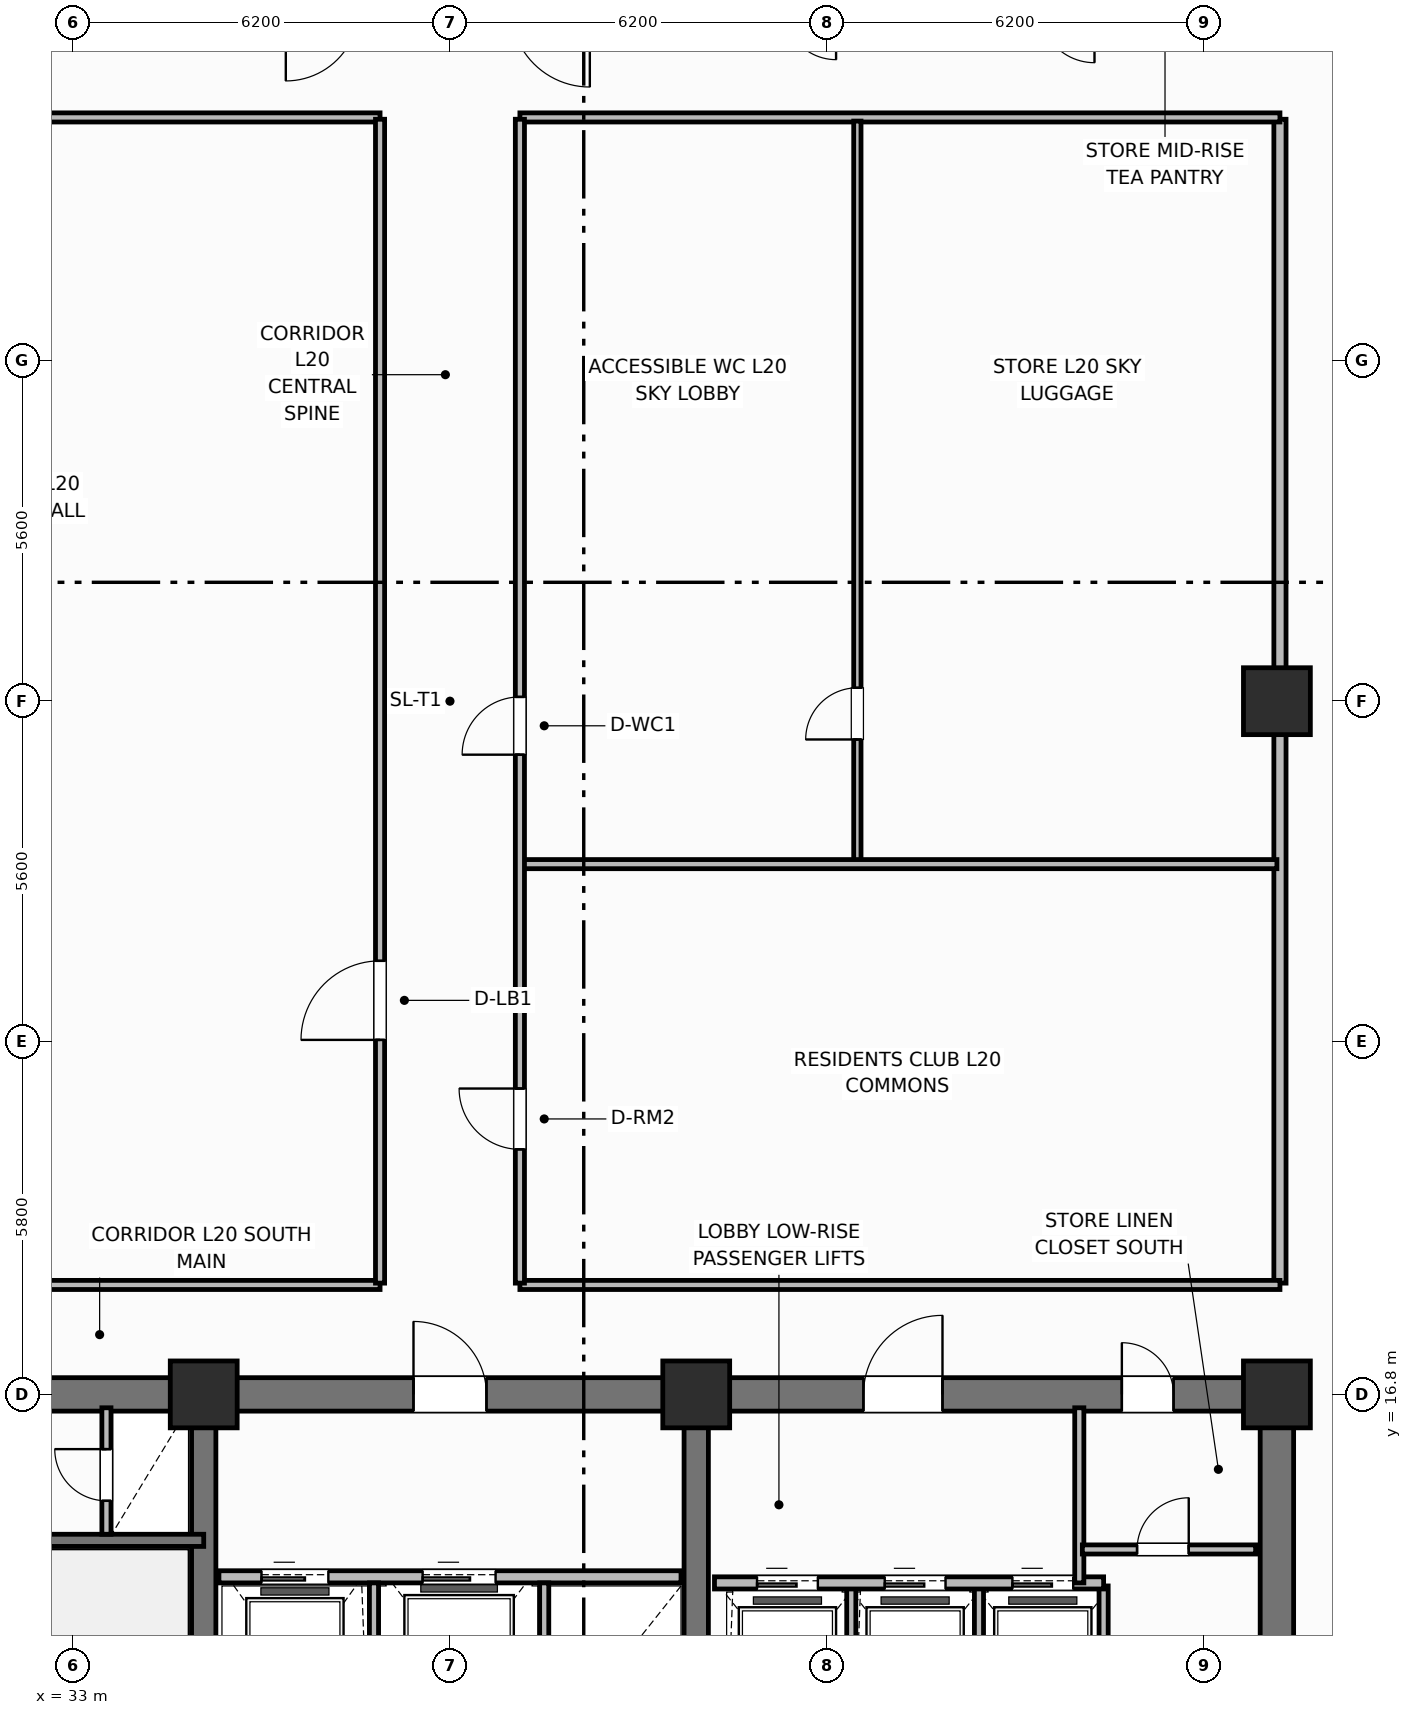
"""IFC4 building model, lengths in metres.
Left out: names, types, materials, properties, quantities, classifications, styles, units other than length and angle.
Written with IfcOpenShell. Run it as: python <this file> out.ifc"""

import sys

from ifc_helpers import new_model, si_unit, direction, frame, frame_2d, origin, origin_2d, place, context, subcontext, project, spatial, rectangle, extrude, element, fill, save


model = new_model("IFC4")
c1 = context("Model", 3, precision=1e-05, world=origin(), true_north=direction((0.0, 1.0)))
c2 = subcontext(c1, "Body", "Model", "MODEL_VIEW")
j1 = project(units=[si_unit("LENGTHUNIT", "METRE"), si_unit("PLANEANGLEUNIT", "RADIAN")], contexts=[c1])
p1 = place(None, origin())
s1 = spatial("IfcSite", under=j1, at=p1, CompositionType="ELEMENT")
p2 = place(p1, origin())
s2 = spatial("IfcBuilding", under=s1, at=p2, CompositionType="ELEMENT")
p3 = place(p2, frame((0.0, 0.0, 84.1)))
s3 = spatial("IfcBuildingStorey", under=s2, at=p3, CompositionType="ELEMENT", Elevation=84.1)
p4 = place(p3, frame((52.8, 10.875, 0.0), z_axis=(0.0, 0.0, 1.0), x_axis=(0.0, 1.0, 0.0)))
e1 = element("IfcWall", 1, at=p4, inside=s3, PredefinedType="SHEAR", context=c2, shape_type="SweptSolid", body=[
    extrude(rectangle(XDim=5.65, YDim=0.55, at=frame_2d((2.825, 0.0))), origin(), (0.0, 0.0, 1.0), 4.2),
])
p5 = place(p3, frame((25.6, 16.8, 0.0), z_axis=(0.0, 0.0, 1.0), x_axis=(1.0, 0.0, 0.0)))
e2 = element("IfcWall", 2, at=p5, inside=s3, PredefinedType="SHEAR", context=c2, shape_type="SweptSolid", body=[
    extrude(rectangle(XDim=27.2, YDim=0.55, at=frame_2d((13.6, 0.0))), origin(), (0.0, 0.0, 1.0), 4.2),
])
p6 = place(p5, frame((1.8, 0.0, 0.0)))
e3 = element("IfcOpeningElement", 3, at=p6, cuts=e2, PredefinedType="OPENING", context=c2, shape_type="SweptSolid", body=[
    extrude(rectangle(XDim=1.1, YDim=2.15, at=frame_2d((0.55, 1.075))), frame((0.0, 0.285, 0.0), z_axis=(0.0, -1.0, 0.0), x_axis=(1.0, 0.0, 0.0)), (0.0, 0.0, 1.0), 0.57),
])
p7 = place(p5, frame((5.6, 0.0, 0.0)))
e4 = element("IfcOpeningElement", 4, at=p7, cuts=e2, PredefinedType="OPENING", context=c2, shape_type="SweptSolid", body=[
    extrude(rectangle(XDim=0.85, YDim=2.1, at=frame_2d((0.425, 1.05))), frame((0.0, 0.285, 0.0), z_axis=(0.0, -1.0, 0.0), x_axis=(1.0, 0.0, 0.0)), (0.0, 0.0, 1.0), 0.57),
])
p8 = place(p5, frame((13.0, 0.0, 0.0)))
e5 = element("IfcOpeningElement", 5, at=p8, cuts=e2, PredefinedType="OPENING", context=c2, shape_type="SweptSolid", body=[
    extrude(rectangle(XDim=1.2, YDim=2.15, at=frame_2d((0.6, 1.075))), frame((0.0, 0.285, 0.0), z_axis=(0.0, -1.0, 0.0), x_axis=(1.0, 0.0, 0.0)), (0.0, 0.0, 1.0), 0.57),
])
p9 = place(p5, frame((20.4, 0.0, 0.0)))
e6 = element("IfcOpeningElement", 6, at=p9, cuts=e2, PredefinedType="OPENING", context=c2, shape_type="SweptSolid", body=[
    extrude(rectangle(XDim=1.3, YDim=2.2, at=frame_2d((0.65, 1.1))), frame((0.0, 0.285, 0.0), z_axis=(0.0, -1.0, 0.0), x_axis=(1.0, 0.0, 0.0)), (0.0, 0.0, 1.0), 0.57),
])
p10 = place(p5, frame((24.65, 0.0, 0.0)))
e7 = element("IfcOpeningElement", 7, at=p10, cuts=e2, PredefinedType="OPENING", context=c2, shape_type="SweptSolid", body=[
    extrude(rectangle(XDim=0.85, YDim=2.1, at=frame_2d((0.425, 1.05))), frame((0.0, 0.285, 0.0), z_axis=(0.0, -1.0, 0.0), x_axis=(1.0, 0.0, 0.0)), (0.0, 0.0, 1.0), 0.57),
])
for number, where, z_axis, x_axis in (
    (8, (35.15, 10.875, 0.0), (0.0, 0.0, 1.0), (0.0, 1.0, 0.0)),
    (9, (43.25, 10.875, 0.0), (0.0, 0.0, 1.0), (0.0, 1.0, 0.0)),
):
    element("IfcWall", number, at=place(p3, frame(where, z_axis=z_axis, x_axis=x_axis)), inside=s3, PredefinedType="SHEAR", context=c2, shape_type="SweptSolid", body=[
        extrude(rectangle(XDim=5.65, YDim=0.4, at=frame_2d((2.825, 0.0))), origin(), (0.0, 0.0, 1.0), 4.2),
    ])
for number, where, z_axis, x_axis in (
    (10, (35.15, 16.8, 0.0), (0.0, 0.0, 1.0), (1.0, 0.0, 0.0)),
    (11, (43.25, 16.8, 0.0), (0.0, 0.0, 1.0), (1.0, 0.0, 0.0)),
    (12, (52.8, 16.8, 0.0), (0.0, 0.0, 1.0), (1.0, 0.0, 0.0)),
    (13, (52.8, 28.2, 0.0), (0.0, 0.0, 1.0), (1.0, 0.0, 0.0)),
):
    element("IfcColumn", number, at=place(p3, frame(where, z_axis=z_axis, x_axis=x_axis)), inside=s3, PredefinedType="COLUMN", context=c2, shape_type="SweptSolid", body=[
        extrude(rectangle(XDim=1.1, YDim=1.1, at=origin_2d()), origin(), (0.0, 0.0, 1.0), 4.2),
    ])
p11 = place(p3, frame((25.6, 14.4, 0.0), z_axis=(0.0, 0.0, 1.0), x_axis=(1.0, 0.0, 0.0)))
e14 = element("IfcWall", 14, at=p11, inside=s3, PredefinedType="SHEAR", context=c2, shape_type="SweptSolid", body=[
    extrude(rectangle(XDim=9.55, YDim=0.2, at=frame_2d((4.775, 0.0))), origin(), (0.0, 0.0, 1.0), 4.2),
])
p12 = place(p11, frame((1.05, 0.0, 0.0)))
e15 = element("IfcOpeningElement", 15, at=p12, cuts=e14, PredefinedType="OPENING", context=c2, shape_type="SweptSolid", body=[
    extrude(rectangle(XDim=1.1, YDim=2.15, at=frame_2d((0.55, 1.075))), frame((0.0, 0.11, 0.0), z_axis=(0.0, -1.0, 0.0), x_axis=(1.0, 0.0, 0.0)), (0.0, 0.0, 1.0), 0.22),
])
p13 = place(p3, frame((33.55, 14.5, 0.0), z_axis=(0.0, 0.0, 1.0), x_axis=(0.0, 1.0, 0.0)))
e16 = element("IfcWall", 16, at=p13, inside=s3, PredefinedType="PARTITIONING", context=c2, shape_type="SweptSolid", body=[
    extrude(rectangle(XDim=2.08, YDim=0.15, at=frame_2d((1.04, 0.0))), origin(), (0.0, 0.0, 1.0), 3.03),
])
p14 = place(p13, frame((0.55, 0.0, 0.0)))
e17 = element("IfcOpeningElement", 17, at=p14, cuts=e16, PredefinedType="OPENING", context=c2, shape_type="SweptSolid", body=[
    extrude(rectangle(XDim=0.85, YDim=2.05, at=frame_2d((0.425, 1.025))), frame((0.0, 0.085, 0.0), z_axis=(0.0, -1.0, 0.0), x_axis=(1.0, 0.0, 0.0)), (0.0, 0.0, 1.0), 0.17),
])
p15 = place(p3, frame((35.4, 13.8, 0.0), z_axis=(0.0, 0.0, 1.0), x_axis=(1.0, 0.0, 0.0)))
e18 = element("IfcWall", 18, at=p15, inside=s3, PredefinedType="PARTITIONING", context=c2, shape_type="SweptSolid", body=[
    extrude(rectangle(XDim=7.6, YDim=0.2, at=frame_2d((3.8, 0.0))), origin(), (0.0, 0.0, 1.0), 2.8),
])
p16 = place(p15, frame((0.7, 0.0, 0.0)))
e19 = element("IfcOpeningElement", 19, at=p16, cuts=e18, PredefinedType="OPENING", context=c2, shape_type="SweptSolid", body=[
    extrude(rectangle(XDim=1.1, YDim=2.15, at=frame_2d((0.55, 1.075))), frame((0.0, 0.11, 0.0), z_axis=(0.0, -1.0, 0.0), x_axis=(1.0, 0.0, 0.0)), (0.0, 0.0, 1.0), 0.22),
])
p17 = place(p15, frame((3.35, 0.0, 0.0)))
e20 = element("IfcOpeningElement", 20, at=p17, cuts=e18, PredefinedType="OPENING", context=c2, shape_type="SweptSolid", body=[
    extrude(rectangle(XDim=1.2, YDim=2.15, at=frame_2d((0.6, 1.075))), frame((0.0, 0.11, 0.0), z_axis=(0.0, -1.0, 0.0), x_axis=(1.0, 0.0, 0.0)), (0.0, 0.0, 1.0), 0.22),
])
for number, where, z_axis, x_axis in (
    (21, (37.95, 10.95, 0.0), (0.0, 0.0, 1.0), (0.0, 1.0, 0.0)),
    (22, (40.75, 10.95, 0.0), (0.0, 0.0, 1.0), (0.0, 1.0, 0.0)),
):
    element("IfcWall", number, at=place(p3, frame(where, z_axis=z_axis, x_axis=x_axis)), inside=s3, PredefinedType="PARTITIONING", context=c2, shape_type="SweptSolid", body=[
        extrude(rectangle(XDim=2.75, YDim=0.15, at=frame_2d((1.375, 0.0))), origin(), (0.0, 0.0, 1.0), 3.03),
    ])
for number, where, z_axis, x_axis in (
    (23, (45.8, 10.95, 0.0), (0.0, 0.0, 1.0), (0.0, 1.0, 0.0)),
    (24, (47.9, 10.95, 0.0), (0.0, 0.0, 1.0), (0.0, 1.0, 0.0)),
    (25, (49.95, 10.95, 0.0), (0.0, 0.0, 1.0), (0.0, 1.0, 0.0)),
):
    element("IfcWall", number, at=place(p3, frame(where, z_axis=z_axis, x_axis=x_axis)), inside=s3, PredefinedType="PARTITIONING", context=c2, shape_type="SweptSolid", body=[
        extrude(rectangle(XDim=2.7, YDim=0.15, at=frame_2d((1.35, 0.0))), origin(), (0.0, 0.0, 1.0), 3.03),
    ])
p18 = place(p3, frame((43.55, 13.7, 0.0), z_axis=(0.0, 0.0, 1.0), x_axis=(1.0, 0.0, 0.0)))
e26 = element("IfcWall", 26, at=p18, inside=s3, PredefinedType="PARTITIONING", context=c2, shape_type="SweptSolid", body=[
    extrude(rectangle(XDim=6.4, YDim=0.2, at=frame_2d((3.2, 0.0))), origin(), (0.0, 0.0, 1.0), 3.03),
])
p19 = place(p18, frame((0.7, 0.0, 0.0)))
e27 = element("IfcOpeningElement", 27, at=p19, cuts=e26, PredefinedType="OPENING", context=c2, shape_type="SweptSolid", body=[
    extrude(rectangle(XDim=1.0, YDim=2.15, at=frame_2d((0.5, 1.075))), frame((0.0, 0.11, 0.0), z_axis=(0.0, -1.0, 0.0), x_axis=(1.0, 0.0, 0.0)), (0.0, 0.0, 1.0), 0.22),
])
p20 = place(p18, frame((2.8, 0.0, 0.0)))
e28 = element("IfcOpeningElement", 28, at=p20, cuts=e26, PredefinedType="OPENING", context=c2, shape_type="SweptSolid", body=[
    extrude(rectangle(XDim=1.0, YDim=2.15, at=frame_2d((0.5, 1.075))), frame((0.0, 0.11, 0.0), z_axis=(0.0, -1.0, 0.0), x_axis=(1.0, 0.0, 0.0)), (0.0, 0.0, 1.0), 0.22),
])
p21 = place(p18, frame((4.9, 0.0, 0.0)))
e29 = element("IfcOpeningElement", 29, at=p21, cuts=e26, PredefinedType="OPENING", context=c2, shape_type="SweptSolid", body=[
    extrude(rectangle(XDim=1.0, YDim=2.15, at=frame_2d((0.5, 1.075))), frame((0.0, 0.11, 0.0), z_axis=(0.0, -1.0, 0.0), x_axis=(1.0, 0.0, 0.0)), (0.0, 0.0, 1.0), 0.22),
])
p22 = place(p3, frame((49.55, 13.7, 0.0), z_axis=(0.0, 0.0, 1.0), x_axis=(0.0, 1.0, 0.0)))
e30 = element("IfcWall", 30, at=p22, inside=s3, PredefinedType="PARTITIONING", context=c2, shape_type="SweptSolid", body=[
    extrude(rectangle(XDim=2.88, YDim=0.15, at=frame_2d((1.44, 0.0))), origin(), (0.0, 0.0, 1.0), 3.03),
])
p23 = place(p3, frame((49.6, 14.25, 0.0), z_axis=(0.0, 0.0, 1.0), x_axis=(1.0, 0.0, 0.0)))
e31 = element("IfcWall", 31, at=p23, inside=s3, PredefinedType="PARTITIONING", context=c2, shape_type="SweptSolid", body=[
    extrude(rectangle(XDim=2.85, YDim=0.15, at=frame_2d((1.425, 0.0))), origin(), (0.0, 0.0, 1.0), 3.03),
])
p24 = place(p23, frame((0.9, 0.0, 0.0)))
e32 = element("IfcOpeningElement", 32, at=p24, cuts=e31, PredefinedType="OPENING", context=c2, shape_type="SweptSolid", body=[
    extrude(rectangle(XDim=0.85, YDim=2.1, at=frame_2d((0.425, 1.05))), frame((0.0, 0.085, 0.0), z_axis=(0.0, -1.0, 0.0), x_axis=(1.0, 0.0, 0.0)), (0.0, 0.0, 1.0), 0.17),
])
p25 = place(p3, frame((52.85, 18.63, 0.0), z_axis=(0.0, 0.0, 1.0), x_axis=(0.0, 1.0, 0.0)))
e33 = element("IfcWall", 33, at=p25, inside=s3, PredefinedType="PARTITIONING", context=c2, shape_type="SweptSolid", body=[
    extrude(rectangle(XDim=19.14, YDim=0.2, at=frame_2d((9.57, 0.0))), origin(), (0.0, 0.0, 1.0), 3.03),
])
for number, where, z_axis, x_axis in (
    (34, (25.55, 18.6, 0.0), (0.0, 0.0, 1.0), (1.0, 0.0, 0.0)),
    (35, (40.35, 18.6, 0.0), (0.0, 0.0, 1.0), (1.0, 0.0, 0.0)),
    (36, (25.55, 37.8, 0.0), (0.0, 0.0, 1.0), (1.0, 0.0, 0.0)),
    (37, (40.35, 37.8, 0.0), (0.0, 0.0, 1.0), (1.0, 0.0, 0.0)),
):
    element("IfcWall", number, at=place(p3, frame(where, z_axis=z_axis, x_axis=x_axis)), inside=s3, PredefinedType="PARTITIONING", context=c2, shape_type="SweptSolid", body=[
        extrude(rectangle(XDim=12.5, YDim=0.15, at=frame_2d((6.25, 0.0))), origin(), (0.0, 0.0, 1.0), 3.03),
    ])
p26 = place(p3, frame((45.9, 25.57, 0.0), z_axis=(0.0, 0.0, 1.0), x_axis=(0.0, 1.0, 0.0)))
e38 = element("IfcWall", 38, at=p26, inside=s3, PredefinedType="PARTITIONING", context=c2, shape_type="SweptSolid", body=[
    extrude(rectangle(XDim=12.17, YDim=0.12, at=frame_2d((6.085, 0.0))), origin(), (0.0, 0.0, 1.0), 3.03),
])
p27 = place(p26, frame((2.0, 0.0, 0.0)))
e39 = element("IfcOpeningElement", 39, at=p27, cuts=e38, PredefinedType="OPENING", context=c2, shape_type="SweptSolid", body=[
    extrude(rectangle(XDim=0.85, YDim=2.1, at=frame_2d((0.425, 1.05))), frame((0.0, 0.07, 0.0), z_axis=(0.0, -1.0, 0.0), x_axis=(1.0, 0.0, 0.0)), (0.0, 0.0, 1.0), 0.14),
])
p28 = place(p3, frame((40.38, 25.521, 0.0), z_axis=(0.0, 0.0, 1.0), x_axis=(1.0, 0.0, 0.0)))
e40 = element("IfcWall", 40, at=p28, inside=s3, PredefinedType="PARTITIONING", context=c2, shape_type="SweptSolid", body=[
    extrude(rectangle(XDim=12.42, YDim=0.15, at=frame_2d((6.21, 0.0))), origin(), (0.0, 0.0, 1.0), 3.03),
])
p29 = place(p3, frame((38.05, 18.63, 0.0), z_axis=(0.0, 0.0, 1.0), x_axis=(0.0, 1.0, 0.0)))
e41 = element("IfcWall", 41, at=p29, inside=s3, PredefinedType="PARTITIONING", context=c2, shape_type="SweptSolid", body=[
    extrude(rectangle(XDim=19.14, YDim=0.15, at=frame_2d((9.57, 0.0))), origin(), (0.0, 0.0, 1.0), 3.03),
])
p30 = place(p29, frame((4.0, 0.0, 0.0)))
e42 = element("IfcOpeningElement", 42, at=p30, cuts=e41, PredefinedType="OPENING", context=c2, shape_type="SweptSolid", body=[
    extrude(rectangle(XDim=1.3, YDim=2.2, at=frame_2d((0.65, 1.1))), frame((0.0, 0.085, 0.0), z_axis=(0.0, -1.0, 0.0), x_axis=(1.0, 0.0, 0.0)), (0.0, 0.0, 1.0), 0.17),
])
p31 = place(p3, frame((40.35, 18.63, 0.0), z_axis=(0.0, 0.0, 1.0), x_axis=(0.0, 1.0, 0.0)))
e43 = element("IfcWall", 43, at=p31, inside=s3, PredefinedType="PARTITIONING", context=c2, shape_type="SweptSolid", body=[
    extrude(rectangle(XDim=19.14, YDim=0.15, at=frame_2d((9.57, 0.0))), origin(), (0.0, 0.0, 1.0), 3.03),
])
p32 = place(p31, frame((2.2, 0.0, 0.0)))
e44 = element("IfcOpeningElement", 44, at=p32, cuts=e43, PredefinedType="OPENING", context=c2, shape_type="SweptSolid", body=[
    extrude(rectangle(XDim=1.0, YDim=2.15, at=frame_2d((0.5, 1.075))), frame((0.0, 0.085, 0.0), z_axis=(0.0, -1.0, 0.0), x_axis=(1.0, 0.0, 0.0)), (0.0, 0.0, 1.0), 0.17),
])
p33 = place(p31, frame((8.69, 0.0, 0.0)))
e45 = element("IfcOpeningElement", 45, at=p33, cuts=e43, PredefinedType="OPENING", context=c2, shape_type="SweptSolid", body=[
    extrude(rectangle(XDim=0.95, YDim=2.1, at=frame_2d((0.475, 1.05))), frame((0.0, 0.085, 0.0), z_axis=(0.0, -1.0, 0.0), x_axis=(1.0, 0.0, 0.0)), (0.0, 0.0, 1.0), 0.17),
])
p34 = place(p14, origin())
e46 = element("IfcDoor", 46, at=p34, inside=s3, OperationType="SINGLE_SWING_RIGHT", PredefinedType="TRAPDOOR", context=c2, shape_type="SweptSolid", body=[
    extrude(rectangle(XDim=0.85, YDim=2.05, at=frame_2d((0.425, 1.025))), frame((0.0, 0.025, 0.0), z_axis=(0.0, -1.0, 0.0), x_axis=(1.0, 0.0, 0.0)), (0.0, 0.0, 1.0), 0.05),
])
fill(e17, e46)
p35 = place(p16, origin())
e47 = element("IfcDoor", 47, at=p35, inside=s3, OperationType="SLIDING_TO_LEFT", PredefinedType="DOOR", context=c2, shape_type="SweptSolid", body=[
    extrude(rectangle(XDim=1.1, YDim=2.15, at=frame_2d((0.55, 1.075))), frame((0.0, 0.025, 0.0), z_axis=(0.0, -1.0, 0.0), x_axis=(1.0, 0.0, 0.0)), (0.0, 0.0, 1.0), 0.05),
])
fill(e19, e47)
p36 = place(p17, origin())
e48 = element("IfcDoor", 48, at=p36, inside=s3, OperationType="SLIDING_TO_LEFT", PredefinedType="DOOR", context=c2, shape_type="SweptSolid", body=[
    extrude(rectangle(XDim=1.2, YDim=2.15, at=frame_2d((0.6, 1.075))), frame((0.0, 0.025, 0.0), z_axis=(0.0, -1.0, 0.0), x_axis=(1.0, 0.0, 0.0)), (0.0, 0.0, 1.0), 0.05),
])
fill(e20, e48)
p37 = place(p19, origin())
e49 = element("IfcDoor", 49, at=p37, inside=s3, OperationType="SLIDING_TO_LEFT", PredefinedType="DOOR", context=c2, shape_type="SweptSolid", body=[
    extrude(rectangle(XDim=1.0, YDim=2.15, at=frame_2d((0.5, 1.075))), frame((0.0, 0.025, 0.0), z_axis=(0.0, -1.0, 0.0), x_axis=(1.0, 0.0, 0.0)), (0.0, 0.0, 1.0), 0.05),
])
fill(e27, e49)
p38 = place(p20, origin())
e50 = element("IfcDoor", 50, at=p38, inside=s3, OperationType="SLIDING_TO_LEFT", PredefinedType="DOOR", context=c2, shape_type="SweptSolid", body=[
    extrude(rectangle(XDim=1.0, YDim=2.15, at=frame_2d((0.5, 1.075))), frame((0.0, 0.025, 0.0), z_axis=(0.0, -1.0, 0.0), x_axis=(1.0, 0.0, 0.0)), (0.0, 0.0, 1.0), 0.05),
])
fill(e28, e50)
p39 = place(p21, origin())
e51 = element("IfcDoor", 51, at=p39, inside=s3, OperationType="SLIDING_TO_LEFT", PredefinedType="DOOR", context=c2, shape_type="SweptSolid", body=[
    extrude(rectangle(XDim=1.0, YDim=2.15, at=frame_2d((0.5, 1.075))), frame((0.0, 0.025, 0.0), z_axis=(0.0, -1.0, 0.0), x_axis=(1.0, 0.0, 0.0)), (0.0, 0.0, 1.0), 0.05),
])
fill(e29, e51)
p40 = place(p24, origin())
e52 = element("IfcDoor", 52, at=p40, inside=s3, OperationType="SINGLE_SWING_RIGHT", PredefinedType="DOOR", context=c2, shape_type="SweptSolid", body=[
    extrude(rectangle(XDim=0.85, YDim=2.1, at=frame_2d((0.425, 1.05))), frame((0.0, 0.025, 0.0), z_axis=(0.0, -1.0, 0.0), x_axis=(1.0, 0.0, 0.0)), (0.0, 0.0, 1.0), 0.05),
])
fill(e32, e52)
p41 = place(p27, origin())
e53 = element("IfcDoor", 53, at=p41, inside=s3, OperationType="SINGLE_SWING_LEFT", PredefinedType="DOOR", context=c2, shape_type="SweptSolid", body=[
    extrude(rectangle(XDim=0.85, YDim=2.1, at=frame_2d((0.425, 1.05))), frame((0.0, 0.025, 0.0), z_axis=(0.0, -1.0, 0.0), x_axis=(1.0, 0.0, 0.0)), (0.0, 0.0, 1.0), 0.05),
])
fill(e39, e53)
p42 = place(p30, origin())
e54 = element("IfcDoor", 54, at=p42, inside=s3, OperationType="SINGLE_SWING_LEFT", PredefinedType="DOOR", context=c2, shape_type="SweptSolid", body=[
    extrude(rectangle(XDim=1.3, YDim=2.2, at=frame_2d((0.65, 1.1))), frame((0.0, 0.025, 0.0), z_axis=(0.0, -1.0, 0.0), x_axis=(1.0, 0.0, 0.0)), (0.0, 0.0, 1.0), 0.05),
])
fill(e42, e54)
p43 = place(p32, origin())
e55 = element("IfcDoor", 55, at=p43, inside=s3, OperationType="SINGLE_SWING_RIGHT", PredefinedType="DOOR", context=c2, shape_type="SweptSolid", body=[
    extrude(rectangle(XDim=1.0, YDim=2.15, at=frame_2d((0.5, 1.075))), frame((0.0, 0.025, 0.0), z_axis=(0.0, -1.0, 0.0), x_axis=(1.0, 0.0, 0.0)), (0.0, 0.0, 1.0), 0.05),
])
fill(e44, e55)
p44 = place(p33, origin())
e56 = element("IfcDoor", 56, at=p44, inside=s3, OperationType="SINGLE_SWING_LEFT", PredefinedType="DOOR", context=c2, shape_type="SweptSolid", body=[
    extrude(rectangle(XDim=0.95, YDim=2.1, at=frame_2d((0.475, 1.05))), frame((0.0, 0.025, 0.0), z_axis=(0.0, -1.0, 0.0), x_axis=(1.0, 0.0, 0.0)), (0.0, 0.0, 1.0), 0.05),
])
fill(e45, e56)
p45 = place(p8, origin())
e57 = element("IfcDoor", 57, at=p45, inside=s3, OperationType="SINGLE_SWING_LEFT", PredefinedType="DOOR", context=c2, shape_type="SweptSolid", body=[
    extrude(rectangle(XDim=1.2, YDim=2.15, at=frame_2d((0.6, 1.075))), frame((0.0, 0.025, 0.0), z_axis=(0.0, -1.0, 0.0), x_axis=(1.0, 0.0, 0.0)), (0.0, 0.0, 1.0), 0.05),
])
fill(e5, e57)
p46 = place(p9, origin())
e58 = element("IfcDoor", 58, at=p46, inside=s3, OperationType="SINGLE_SWING_RIGHT", PredefinedType="DOOR", context=c2, shape_type="SweptSolid", body=[
    extrude(rectangle(XDim=1.3, YDim=2.2, at=frame_2d((0.65, 1.1))), frame((0.0, 0.025, 0.0), z_axis=(0.0, -1.0, 0.0), x_axis=(1.0, 0.0, 0.0)), (0.0, 0.0, 1.0), 0.05),
])
fill(e6, e58)
p47 = place(p10, origin())
e59 = element("IfcDoor", 59, at=p47, inside=s3, OperationType="SINGLE_SWING_LEFT", PredefinedType="DOOR", context=c2, shape_type="SweptSolid", body=[
    extrude(rectangle(XDim=0.85, YDim=2.1, at=frame_2d((0.425, 1.05))), frame((0.0, 0.025, 0.0), z_axis=(0.0, -1.0, 0.0), x_axis=(1.0, 0.0, 0.0)), (0.0, 0.0, 1.0), 0.05),
])
fill(e7, e59)
save(model, sys.argv[1])
